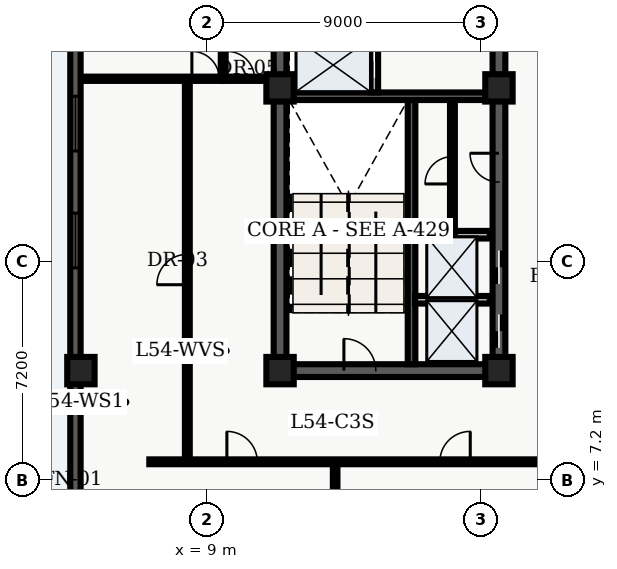
"""IFC4 building model, lengths in metres.
Left out: names, types, materials, properties, quantities, classifications, styles, units other than length and angle.
Written with IfcOpenShell. Run it as: python <this file> out.ifc"""

import sys

from ifc_helpers import new_model, entity, si_unit, converted_unit, direction, frame, origin_with_axes, origin_2d_with_axis, place, context, subcontext, project, spatial, polyline, rectangle, outline, extrude, element, fill, save


model = new_model("IFC4")
c1 = context("Model", 3, precision=1e-05, world=origin_with_axes(), true_north=direction((0.0, 1.0)))
c2 = subcontext(c1, "Body", "Model", "MODEL_VIEW")
j1 = project(units=[si_unit("LENGTHUNIT", "METRE"), converted_unit("PLANEANGLEUNIT", "DEGREE", entity("IfcPlaneAngleMeasure", 0.017), si_unit("PLANEANGLEUNIT", "RADIAN"), dimensions=[0, 0, 0, 0, 0, 0, 0])], contexts=[c1])
p1 = place(None, origin_with_axes())
s1 = spatial("IfcSite", under=j1, at=p1, CompositionType="ELEMENT")
p2 = place(p1, origin_with_axes())
s2 = spatial("IfcBuilding", under=s1, at=p2, CompositionType="ELEMENT")
p3 = place(p2, frame((0.0, 0.0, 219.9), z_axis=(0.0, 0.0, 1.0), x_axis=(1.0, 0.0, 0.0)))
s3 = spatial("IfcBuildingStorey", under=s2, at=p3, CompositionType="ELEMENT", Elevation=219.9)
p4 = place(p3, frame((11.4, 10.8, 0.0), z_axis=(0.0, 0.0, 1.0), x_axis=(0.0, 1.0, 0.0)))
e1 = element("IfcWall", 1, at=p4, inside=s3, PredefinedType="SHEAR", context=c2, shape_type="SweptSolid", body=[
    extrude(outline(polyline([(0.0, -0.21), (27.0, -0.21), (27.0, 0.21), (0.0, 0.21), (0.0, -0.21)])), origin_with_axes(), (0.0, 0.0, 1.0), 4.56),
])
p5 = place(p3, frame((11.4, 10.8, 0.0), z_axis=(0.0, 0.0, 1.0), x_axis=(1.0, 0.0, 0.0)))
e2 = element("IfcWall", 2, at=p5, inside=s3, PredefinedType="SHEAR", context=c2, shape_type="SweptSolid", body=[
    extrude(outline(polyline([(0.0, -0.21), (7.2, -0.21), (7.2, 0.21), (0.0, 0.21), (0.0, -0.21)])), origin_with_axes(), (0.0, 0.0, 1.0), 4.56),
])
p6 = place(p5, frame((2.625, 0.0, 0.0), z_axis=(0.0, 0.0, 1.0), x_axis=(1.0, 0.0, 0.0)))
e3 = element("IfcOpeningElement", 3, at=p6, cuts=e2, PredefinedType="OPENING", context=c2, shape_type="SweptSolid", body=[
    extrude(rectangle(XDim=1.05, YDim=0.44, at=origin_2d_with_axis()), origin_with_axes(), (0.0, 0.0, 1.0), 2.15),
])
p7 = place(p3, frame((18.6, 10.8, 0.0), z_axis=(0.0, 0.0, 1.0), x_axis=(0.0, 1.0, 0.0)))
e4 = element("IfcWall", 4, at=p7, inside=s3, PredefinedType="SHEAR", context=c2, shape_type="SweptSolid", body=[
    extrude(outline(polyline([(0.0, -0.21), (13.5, -0.21), (13.5, 0.21), (0.0, 0.21), (0.0, -0.21)])), origin_with_axes(), (0.0, 0.0, 1.0), 4.56),
])
p8 = place(p7, frame((1.3, 0.0, 0.0), z_axis=(0.0, 0.0, 1.0), x_axis=(1.0, 0.0, 0.0)))
e5 = element("IfcOpeningElement", 5, at=p8, cuts=e4, PredefinedType="OPENING", context=c2, shape_type="SweptSolid", body=[
    extrude(rectangle(XDim=1.1, YDim=0.44, at=origin_2d_with_axis()), origin_with_axes(), (0.0, 0.0, 1.0), 2.15),
])
p9 = place(p7, frame((3.4, 0.0, 0.0), z_axis=(0.0, 0.0, 1.0), x_axis=(1.0, 0.0, 0.0)))
e6 = element("IfcOpeningElement", 6, at=p9, cuts=e4, PredefinedType="OPENING", context=c2, shape_type="SweptSolid", body=[
    extrude(rectangle(XDim=1.1, YDim=0.44, at=origin_2d_with_axis()), origin_with_axes(), (0.0, 0.0, 1.0), 2.15),
])
p10 = place(p7, frame((11.125, 0.0, 0.0), z_axis=(0.0, 0.0, 1.0), x_axis=(1.0, 0.0, 0.0)))
e7 = element("IfcOpeningElement", 7, at=p10, cuts=e4, PredefinedType="OPENING", context=c2, shape_type="SweptSolid", body=[
    extrude(rectangle(XDim=1.05, YDim=0.44, at=origin_2d_with_axis()), origin_with_axes(), (0.0, 0.0, 1.0), 2.15),
])
p11 = place(p7, frame((6.675, 0.0, 0.0), z_axis=(0.0, 0.0, 1.0), x_axis=(1.0, 0.0, 0.0)))
e8 = element("IfcOpeningElement", 8, at=p11, cuts=e4, PredefinedType="OPENING", context=c2, shape_type="SweptSolid", body=[
    extrude(rectangle(XDim=0.95, YDim=0.44, at=origin_2d_with_axis()), origin_with_axes(), (0.0, 0.0, 1.0), 2.15),
])
p12 = place(p3, frame((15.725, 11.01, 0.0), z_axis=(0.0, 0.0, 1.0), x_axis=(0.0, 1.0, 0.0)))
e9 = element("IfcWall", 9, at=p12, inside=s3, PredefinedType="SHEAR", context=c2, shape_type="SweptSolid", body=[
    extrude(outline(polyline([(0.0, -0.125), (8.69, -0.125), (8.69, 0.125), (0.0, 0.125), (0.0, -0.125)])), origin_with_axes(), (0.0, 0.0, 1.0), 4.56),
])
p13 = place(p3, frame((11.61, 19.825, 0.0), z_axis=(0.0, 0.0, 1.0), x_axis=(1.0, 0.0, 0.0)))
e10 = element("IfcWall", 10, at=p13, inside=s3, PredefinedType="SHEAR", context=c2, shape_type="SweptSolid", body=[
    extrude(outline(polyline([(0.0, -0.125), (6.78, -0.125), (6.78, 0.125), (0.0, 0.125), (0.0, -0.125)])), origin_with_axes(), (0.0, 0.0, 1.0), 4.56),
])
p14 = place(p3, frame((14.5, 19.95, 0.0), z_axis=(0.0, 0.0, 1.0), x_axis=(0.0, 1.0, 0.0)))
e11 = element("IfcWall", 11, at=p14, inside=s3, PredefinedType="SOLIDWALL", context=c2, shape_type="SweptSolid", body=[
    extrude(outline(polyline([(0.0, -0.125), (6.25, -0.125), (6.25, 0.125), (0.0, 0.125), (0.0, -0.125)])), origin_with_axes(), (0.0, 0.0, 1.0), 3.6),
])
p15 = place(p14, frame((1.025, 0.0, 0.0), z_axis=(0.0, 0.0, 1.0), x_axis=(1.0, 0.0, 0.0)))
e12 = element("IfcOpeningElement", 12, at=p15, cuts=e11, PredefinedType="OPENING", context=c2, shape_type="SweptSolid", body=[
    extrude(rectangle(XDim=1.1, YDim=0.27, at=origin_2d_with_axis()), origin_with_axes(), (0.0, 0.0, 1.0), 2.15),
])
p16 = place(p14, frame((2.975, 0.0, 0.0), z_axis=(0.0, 0.0, 1.0), x_axis=(1.0, 0.0, 0.0)))
e13 = element("IfcOpeningElement", 13, at=p16, cuts=e11, PredefinedType="OPENING", context=c2, shape_type="SweptSolid", body=[
    extrude(rectangle(XDim=1.1, YDim=0.27, at=origin_2d_with_axis()), origin_with_axes(), (0.0, 0.0, 1.0), 2.15),
])
p17 = place(p14, frame((5.425, 0.0, 0.0), z_axis=(0.0, 0.0, 1.0), x_axis=(1.0, 0.0, 0.0)))
e14 = element("IfcOpeningElement", 14, at=p17, cuts=e11, PredefinedType="OPENING", context=c2, shape_type="SweptSolid", body=[
    extrude(rectangle(XDim=1.2, YDim=0.27, at=origin_2d_with_axis()), origin_with_axes(), (0.0, 0.0, 1.0), 2.15),
])
for number, where, z_axis, x_axis in (
    (15, (11.4, 10.8, 0.0), (0.0, 0.0, 1.0), (1.0, 0.0, 0.0)),
    (16, (11.4, 20.1, 0.0), (0.0, 0.0, 1.0), (1.0, 0.0, 0.0)),
    (17, (18.6, 10.8, 0.0), (0.0, 0.0, 1.0), (1.0, 0.0, 0.0)),
    (18, (18.6, 20.1, 0.0), (0.0, 0.0, 1.0), (1.0, 0.0, 0.0)),
    (19, (4.85, 10.8, 0.0), (0.0, 0.0, 1.0), (1.0, 0.0, 0.0)),
):
    element("IfcColumn", number, at=place(p3, frame(where, z_axis=z_axis, x_axis=x_axis)), inside=s3, PredefinedType="COLUMN", context=c2, shape_type="SweptSolid", body=[
        extrude(rectangle(XDim=0.9, YDim=0.9, at=origin_2d_with_axis()), origin_with_axes(), (0.0, 0.0, 1.0), 4.8),
    ])
for number, where, z_axis, x_axis in (
    (20, (15.84, 13.13, 0.0), (0.0, 0.0, 1.0), (1.0, 0.0, 0.0)),
    (21, (15.84, 15.27, 0.0), (0.0, 0.0, 1.0), (1.0, 0.0, 0.0)),
):
    element("IfcWall", number, at=place(p3, frame(where, z_axis=z_axis, x_axis=x_axis)), inside=s3, PredefinedType="SOLIDWALL", context=c2, shape_type="SweptSolid", body=[
        extrude(outline(polyline([(0.0, -0.125), (2.46, -0.125), (2.46, 0.125), (0.0, 0.125), (0.0, -0.125)])), origin_with_axes(), (0.0, 0.0, 1.0), 3.2),
    ])
p18 = place(p3, frame((17.07, 15.34, 0.0), z_axis=(0.0, 0.0, 1.0), x_axis=(0.0, 1.0, 0.0)))
e22 = element("IfcWall", 22, at=p18, inside=s3, PredefinedType="PARTITIONING", context=c2, shape_type="SweptSolid", body=[
    extrude(outline(polyline([(0.0, -0.08), (4.36, -0.08), (4.36, 0.08), (0.0, 0.08), (0.0, -0.08)])), origin_with_axes(), (0.0, 0.0, 1.0), 3.2),
])
p19 = place(p18, frame((2.05, 0.0, 0.0), z_axis=(0.0, 0.0, 1.0), x_axis=(1.0, 0.0, 0.0)))
e23 = element("IfcOpeningElement", 23, at=p19, cuts=e22, PredefinedType="OPENING", context=c2, shape_type="SweptSolid", body=[
    extrude(rectangle(XDim=0.9, YDim=0.18, at=origin_2d_with_axis()), origin_with_axes(), (0.0, 0.0, 1.0), 2.15),
])
p20 = place(p3, frame((9.52, 20.4, 0.0), z_axis=(0.0, 0.0, 1.0), x_axis=(0.0, 1.0, 0.0)))
e24 = element("IfcWall", 24, at=p20, inside=s3, PredefinedType="PARTITIONING", context=c2, shape_type="SweptSolid", body=[
    extrude(outline(polyline([(0.0, -0.07), (4.0, -0.07), (4.0, 0.07), (0.0, 0.07), (0.0, -0.07)])), origin_with_axes(), (0.0, 0.0, 1.0), 3.2),
])
p21 = place(p3, frame((9.52, 20.4, 0.0), z_axis=(0.0, 0.0, 1.0), x_axis=(1.0, 0.0, 0.0)))
e25 = element("IfcWall", 25, at=p21, inside=s3, PredefinedType="PARTITIONING", context=c2, shape_type="SweptSolid", body=[
    extrude(outline(polyline([(0.0, -0.07), (1.58, -0.07), (1.58, 0.07), (0.0, 0.07), (0.0, -0.07)])), origin_with_axes(), (0.0, 0.0, 1.0), 3.2),
])
p22 = place(p21, frame((0.59, 0.0, 0.0), z_axis=(0.0, 0.0, 1.0), x_axis=(1.0, 0.0, 0.0)))
e26 = element("IfcOpeningElement", 26, at=p22, cuts=e25, PredefinedType="OPENING", context=c2, shape_type="SweptSolid", body=[
    extrude(rectangle(XDim=0.9, YDim=0.16, at=origin_2d_with_axis()), origin_with_axes(), (0.0, 0.0, 1.0), 2.15),
])
p23 = place(p3, frame((7.1, 7.8, 0.0), z_axis=(0.0, 0.0, 1.0), x_axis=(1.0, 0.0, 0.0)))
e27 = element("IfcWall", 27, at=p23, inside=s3, PredefinedType="PARTITIONING", context=c2, shape_type="SweptSolid", body=[
    extrude(outline(polyline([(0.0, -0.08), (14.05, -0.08), (14.05, 0.08), (0.0, 0.08), (0.0, -0.08)])), origin_with_axes(), (0.0, 0.0, 1.0), 3.2),
])
p24 = place(p23, frame((3.051, 0.0, 0.0), z_axis=(0.0, 0.0, 1.0), x_axis=(1.0, 0.0, 0.0)))
e28 = element("IfcOpeningElement", 28, at=p24, cuts=e27, PredefinedType="OPENING", context=c2, shape_type="SweptSolid", body=[
    extrude(rectangle(XDim=1.0, YDim=0.18, at=origin_2d_with_axis()), origin_with_axes(), (0.0, 0.0, 1.0), 2.15),
])
p25 = place(p23, frame((10.056, 0.0, 0.0), z_axis=(0.0, 0.0, 1.0), x_axis=(1.0, 0.0, 0.0)))
e29 = element("IfcOpeningElement", 29, at=p25, cuts=e27, PredefinedType="OPENING", context=c2, shape_type="SweptSolid", body=[
    extrude(rectangle(XDim=1.0, YDim=0.18, at=origin_2d_with_axis()), origin_with_axes(), (0.0, 0.0, 1.0), 2.15),
])
p26 = place(p3, frame((8.35, 7.8, 0.0), z_axis=(0.0, 0.0, 1.0), x_axis=(0.0, 1.0, 0.0)))
e30 = element("IfcWall", 30, at=p26, inside=s3, PredefinedType="PARTITIONING", context=c2, shape_type="SweptSolid", body=[
    extrude(outline(polyline([(0.0, -0.08), (12.6, -0.08), (12.6, 0.08), (0.0, 0.08), (0.0, -0.08)])), origin_with_axes(), (0.0, 0.0, 1.0), 3.2),
])
p27 = place(p26, frame((6.325, 0.0, 0.0), z_axis=(0.0, 0.0, 1.0), x_axis=(1.0, 0.0, 0.0)))
e31 = element("IfcOpeningElement", 31, at=p27, cuts=e30, PredefinedType="OPENING", context=c2, shape_type="SweptSolid", body=[
    extrude(rectangle(XDim=1.0, YDim=0.18, at=origin_2d_with_axis()), origin_with_axes(), (0.0, 0.0, 1.0), 2.15),
])
p28 = place(p3, frame((4.835, 20.4, 0.0), z_axis=(0.0, 0.0, 1.0), x_axis=(1.0, 0.0, 0.0)))
e32 = element("IfcWall", 32, at=p28, inside=s3, PredefinedType="PARTITIONING", context=c2, shape_type="SweptSolid", body=[
    extrude(outline(polyline([(0.0, -0.07), (4.685, -0.07), (4.685, 0.07), (0.0, 0.07), (0.0, -0.07)])), origin_with_axes(), (0.0, 0.0, 1.0), 3.2),
])
p29 = place(p28, frame((4.115, 0.0, 0.0), z_axis=(0.0, 0.0, 1.0), x_axis=(1.0, 0.0, 0.0)))
e33 = element("IfcOpeningElement", 33, at=p29, cuts=e32, PredefinedType="OPENING", context=c2, shape_type="SweptSolid", body=[
    extrude(rectangle(XDim=0.9, YDim=0.16, at=origin_2d_with_axis()), origin_with_axes(), (0.0, 0.0, 1.0), 2.15),
])
p30 = place(p3, frame((13.212, 0.335, 0.0), z_axis=(0.0, 0.0, 1.0), x_axis=(0.0, 1.0, 0.0)))
e34 = element("IfcWall", 34, at=p30, inside=s3, PredefinedType="PARTITIONING", context=c2, shape_type="SweptSolid", body=[
    extrude(outline(polyline([(0.0, -0.075), (7.365, -0.075), (7.365, 0.075), (0.0, 0.075), (0.0, -0.075)])), origin_with_axes(), (0.0, 0.0, 1.0), 3.2),
])
p31 = place(p3, frame((4.67, 2.74, 0.0), z_axis=(0.0, 0.0, 1.0), x_axis=(0.0, 1.0, 0.0)))
e35 = element("IfcWall", 35, at=p31, inside=s3, PredefinedType="SOLIDWALL", context=c2, shape_type="SweptSolid", body=[
    extrude(outline(polyline([(0.0, -0.17), (43.46, -0.17), (43.46, 0.17), (0.0, 0.17), (0.0, -0.17)])), origin_with_axes(), (0.0, 0.0, 1.0), 4.56),
])
p32 = place(p31, frame((2.948, 0.0, 0.45), z_axis=(0.0, 0.0, 1.0), x_axis=(1.0, 0.0, 0.0)))
e36 = element("IfcOpeningElement", 36, at=p32, cuts=e35, PredefinedType="OPENING", context=c2, shape_type="SweptSolid", body=[
    extrude(rectangle(XDim=1.8, YDim=0.36, at=origin_2d_with_axis()), origin_with_axes(), (0.0, 0.0, 1.0), 2.1),
])
p33 = place(p31, frame((12.339, 0.0, 0.45), z_axis=(0.0, 0.0, 1.0), x_axis=(1.0, 0.0, 0.0)))
e37 = element("IfcOpeningElement", 37, at=p33, cuts=e35, PredefinedType="OPENING", context=c2, shape_type="SweptSolid", body=[
    extrude(rectangle(XDim=1.8, YDim=0.36, at=origin_2d_with_axis()), origin_with_axes(), (0.0, 0.0, 1.0), 2.1),
])
p34 = place(p31, frame((16.184, 0.0, 0.45), z_axis=(0.0, 0.0, 1.0), x_axis=(1.0, 0.0, 0.0)))
e38 = element("IfcOpeningElement", 38, at=p34, cuts=e35, PredefinedType="OPENING", context=c2, shape_type="SweptSolid", body=[
    extrude(rectangle(XDim=1.8, YDim=0.36, at=origin_2d_with_axis()), origin_with_axes(), (0.0, 0.0, 1.0), 2.1),
])
p35 = place(p31, frame((26.426, 0.0, 0.45), z_axis=(0.0, 0.0, 1.0), x_axis=(1.0, 0.0, 0.0)))
e39 = element("IfcOpeningElement", 39, at=p35, cuts=e35, PredefinedType="OPENING", context=c2, shape_type="SweptSolid", body=[
    extrude(rectangle(XDim=1.8, YDim=0.36, at=origin_2d_with_axis()), origin_with_axes(), (0.0, 0.0, 1.0), 2.1),
])
p36 = place(p31, frame((31.121, 0.0, 0.45), z_axis=(0.0, 0.0, 1.0), x_axis=(1.0, 0.0, 0.0)))
e40 = element("IfcOpeningElement", 40, at=p36, cuts=e35, PredefinedType="OPENING", context=c2, shape_type="SweptSolid", body=[
    extrude(rectangle(XDim=1.8, YDim=0.36, at=origin_2d_with_axis()), origin_with_axes(), (0.0, 0.0, 1.0), 2.1),
])
p37 = place(p31, frame((40.062, 0.0, 0.45), z_axis=(0.0, 0.0, 1.0), x_axis=(1.0, 0.0, 0.0)))
e41 = element("IfcOpeningElement", 41, at=p37, cuts=e35, PredefinedType="OPENING", context=c2, shape_type="SweptSolid", body=[
    extrude(rectangle(XDim=1.8, YDim=0.36, at=origin_2d_with_axis()), origin_with_axes(), (0.0, 0.0, 1.0), 2.1),
])
p38 = place(p7, frame((1.3, 0.0, 0.0), z_axis=(0.0, 0.0, 1.0), x_axis=(1.0, 0.0, 0.0)))
e42 = element("IfcDoor", 42, at=p38, inside=s3, OperationType="SLIDING_TO_LEFT", PredefinedType="DOOR", context=c2, shape_type="SweptSolid", body=[
    extrude(rectangle(XDim=1.1, YDim=0.09, at=origin_2d_with_axis()), origin_with_axes(), (0.0, 0.0, 1.0), 2.15),
])
fill(e5, e42)
p39 = place(p7, frame((3.4, 0.0, 0.0), z_axis=(0.0, 0.0, 1.0), x_axis=(1.0, 0.0, 0.0)))
e43 = element("IfcDoor", 43, at=p39, inside=s3, OperationType="SLIDING_TO_RIGHT", PredefinedType="DOOR", context=c2, shape_type="SweptSolid", body=[
    extrude(rectangle(XDim=1.1, YDim=0.09, at=origin_2d_with_axis()), origin_with_axes(), (0.0, 0.0, 1.0), 2.15),
])
fill(e6, e43)
p40 = place(p14, frame((1.025, 0.0, 0.0), z_axis=(0.0, 0.0, 1.0), x_axis=(1.0, 0.0, 0.0)))
e44 = element("IfcDoor", 44, at=p40, inside=s3, OperationType="SLIDING_TO_LEFT", PredefinedType="DOOR", context=c2, shape_type="SweptSolid", body=[
    extrude(rectangle(XDim=1.1, YDim=0.09, at=origin_2d_with_axis()), origin_with_axes(), (0.0, 0.0, 1.0), 2.15),
])
fill(e12, e44)
p41 = place(p5, frame((2.625, 0.0, 0.0), z_axis=(0.0, 0.0, 1.0), x_axis=(1.0, 0.0, 0.0)))
e45 = element("IfcDoor", 45, at=p41, inside=s3, OperationType="SINGLE_SWING_LEFT", PredefinedType="DOOR", context=c2, shape_type="SweptSolid", body=[
    extrude(rectangle(XDim=1.05, YDim=0.09, at=origin_2d_with_axis()), origin_with_axes(), (0.0, 0.0, 1.0), 2.15),
])
fill(e3, e45)
p42 = place(p18, frame((2.05, 0.0, 0.0), z_axis=(0.0, 0.0, 1.0), x_axis=(1.0, 0.0, 0.0)))
e46 = element("IfcDoor", 46, at=p42, inside=s3, OperationType="SINGLE_SWING_LEFT", PredefinedType="DOOR", context=c2, shape_type="SweptSolid", body=[
    extrude(rectangle(XDim=0.9, YDim=0.09, at=origin_2d_with_axis()), origin_with_axes(), (0.0, 0.0, 1.0), 2.15),
])
fill(e23, e46)
p43 = place(p7, frame((6.675, 0.0, 0.0), z_axis=(0.0, 0.0, 1.0), x_axis=(1.0, 0.0, 0.0)))
e47 = element("IfcDoor", 47, at=p43, inside=s3, OperationType="SINGLE_SWING_RIGHT", PredefinedType="DOOR", context=c2, shape_type="SweptSolid", body=[
    extrude(rectangle(XDim=0.95, YDim=0.09, at=origin_2d_with_axis()), origin_with_axes(), (0.0, 0.0, 1.0), 2.15),
])
fill(e8, e47)
p44 = place(p21, frame((0.59, 0.0, 0.0), z_axis=(0.0, 0.0, 1.0), x_axis=(1.0, 0.0, 0.0)))
e48 = element("IfcDoor", 48, at=p44, inside=s3, OperationType="SINGLE_SWING_LEFT", PredefinedType="DOOR", context=c2, shape_type="SweptSolid", body=[
    extrude(rectangle(XDim=0.9, YDim=0.084, at=origin_2d_with_axis()), origin_with_axes(), (0.0, 0.0, 1.0), 2.15),
])
fill(e26, e48)
p45 = place(p28, frame((4.115, 0.0, 0.0), z_axis=(0.0, 0.0, 1.0), x_axis=(1.0, 0.0, 0.0)))
e49 = element("IfcDoor", 49, at=p45, inside=s3, OperationType="SINGLE_SWING_LEFT", PredefinedType="DOOR", context=c2, shape_type="SweptSolid", body=[
    extrude(rectangle(XDim=0.9, YDim=0.084, at=origin_2d_with_axis()), origin_with_axes(), (0.0, 0.0, 1.0), 2.15),
])
fill(e33, e49)
p46 = place(p26, frame((6.325, 0.0, 0.0), z_axis=(0.0, 0.0, 1.0), x_axis=(1.0, 0.0, 0.0)))
e50 = element("IfcDoor", 50, at=p46, inside=s3, OperationType="SINGLE_SWING_LEFT", PredefinedType="DOOR", context=c2, shape_type="SweptSolid", body=[
    extrude(rectangle(XDim=1.0, YDim=0.09, at=origin_2d_with_axis()), origin_with_axes(), (0.0, 0.0, 1.0), 2.15),
])
fill(e31, e50)
p47 = place(p23, frame((3.051, 0.0, 0.0), z_axis=(0.0, 0.0, 1.0), x_axis=(1.0, 0.0, 0.0)))
e51 = element("IfcDoor", 51, at=p47, inside=s3, OperationType="SINGLE_SWING_LEFT", PredefinedType="DOOR", context=c2, shape_type="SweptSolid", body=[
    extrude(rectangle(XDim=1.0, YDim=0.09, at=origin_2d_with_axis()), origin_with_axes(), (0.0, 0.0, 1.0), 2.15),
])
fill(e28, e51)
p48 = place(p23, frame((10.056, 0.0, 0.0), z_axis=(0.0, 0.0, 1.0), x_axis=(1.0, 0.0, 0.0)))
e52 = element("IfcDoor", 52, at=p48, inside=s3, OperationType="SINGLE_SWING_RIGHT", PredefinedType="DOOR", context=c2, shape_type="SweptSolid", body=[
    extrude(rectangle(XDim=1.0, YDim=0.09, at=origin_2d_with_axis()), origin_with_axes(), (0.0, 0.0, 1.0), 2.15),
])
fill(e29, e52)
p49 = place(p31, frame((12.339, 0.0, 0.45), z_axis=(0.0, 0.0, 1.0), x_axis=(1.0, 0.0, 0.0)))
e53 = element("IfcWindow", 53, at=p49, inside=s3, PredefinedType="WINDOW", context=c2, shape_type="SweptSolid", body=[
    extrude(rectangle(XDim=1.8, YDim=0.09, at=origin_2d_with_axis()), origin_with_axes(), (0.0, 0.0, 1.0), 2.1),
])
fill(e37, e53)
p50 = place(p31, frame((16.184, 0.0, 0.45), z_axis=(0.0, 0.0, 1.0), x_axis=(1.0, 0.0, 0.0)))
e54 = element("IfcWindow", 54, at=p50, inside=s3, PredefinedType="WINDOW", context=c2, shape_type="SweptSolid", body=[
    extrude(rectangle(XDim=1.8, YDim=0.09, at=origin_2d_with_axis()), origin_with_axes(), (0.0, 0.0, 1.0), 2.1),
])
fill(e38, e54)
save(model, sys.argv[1])
